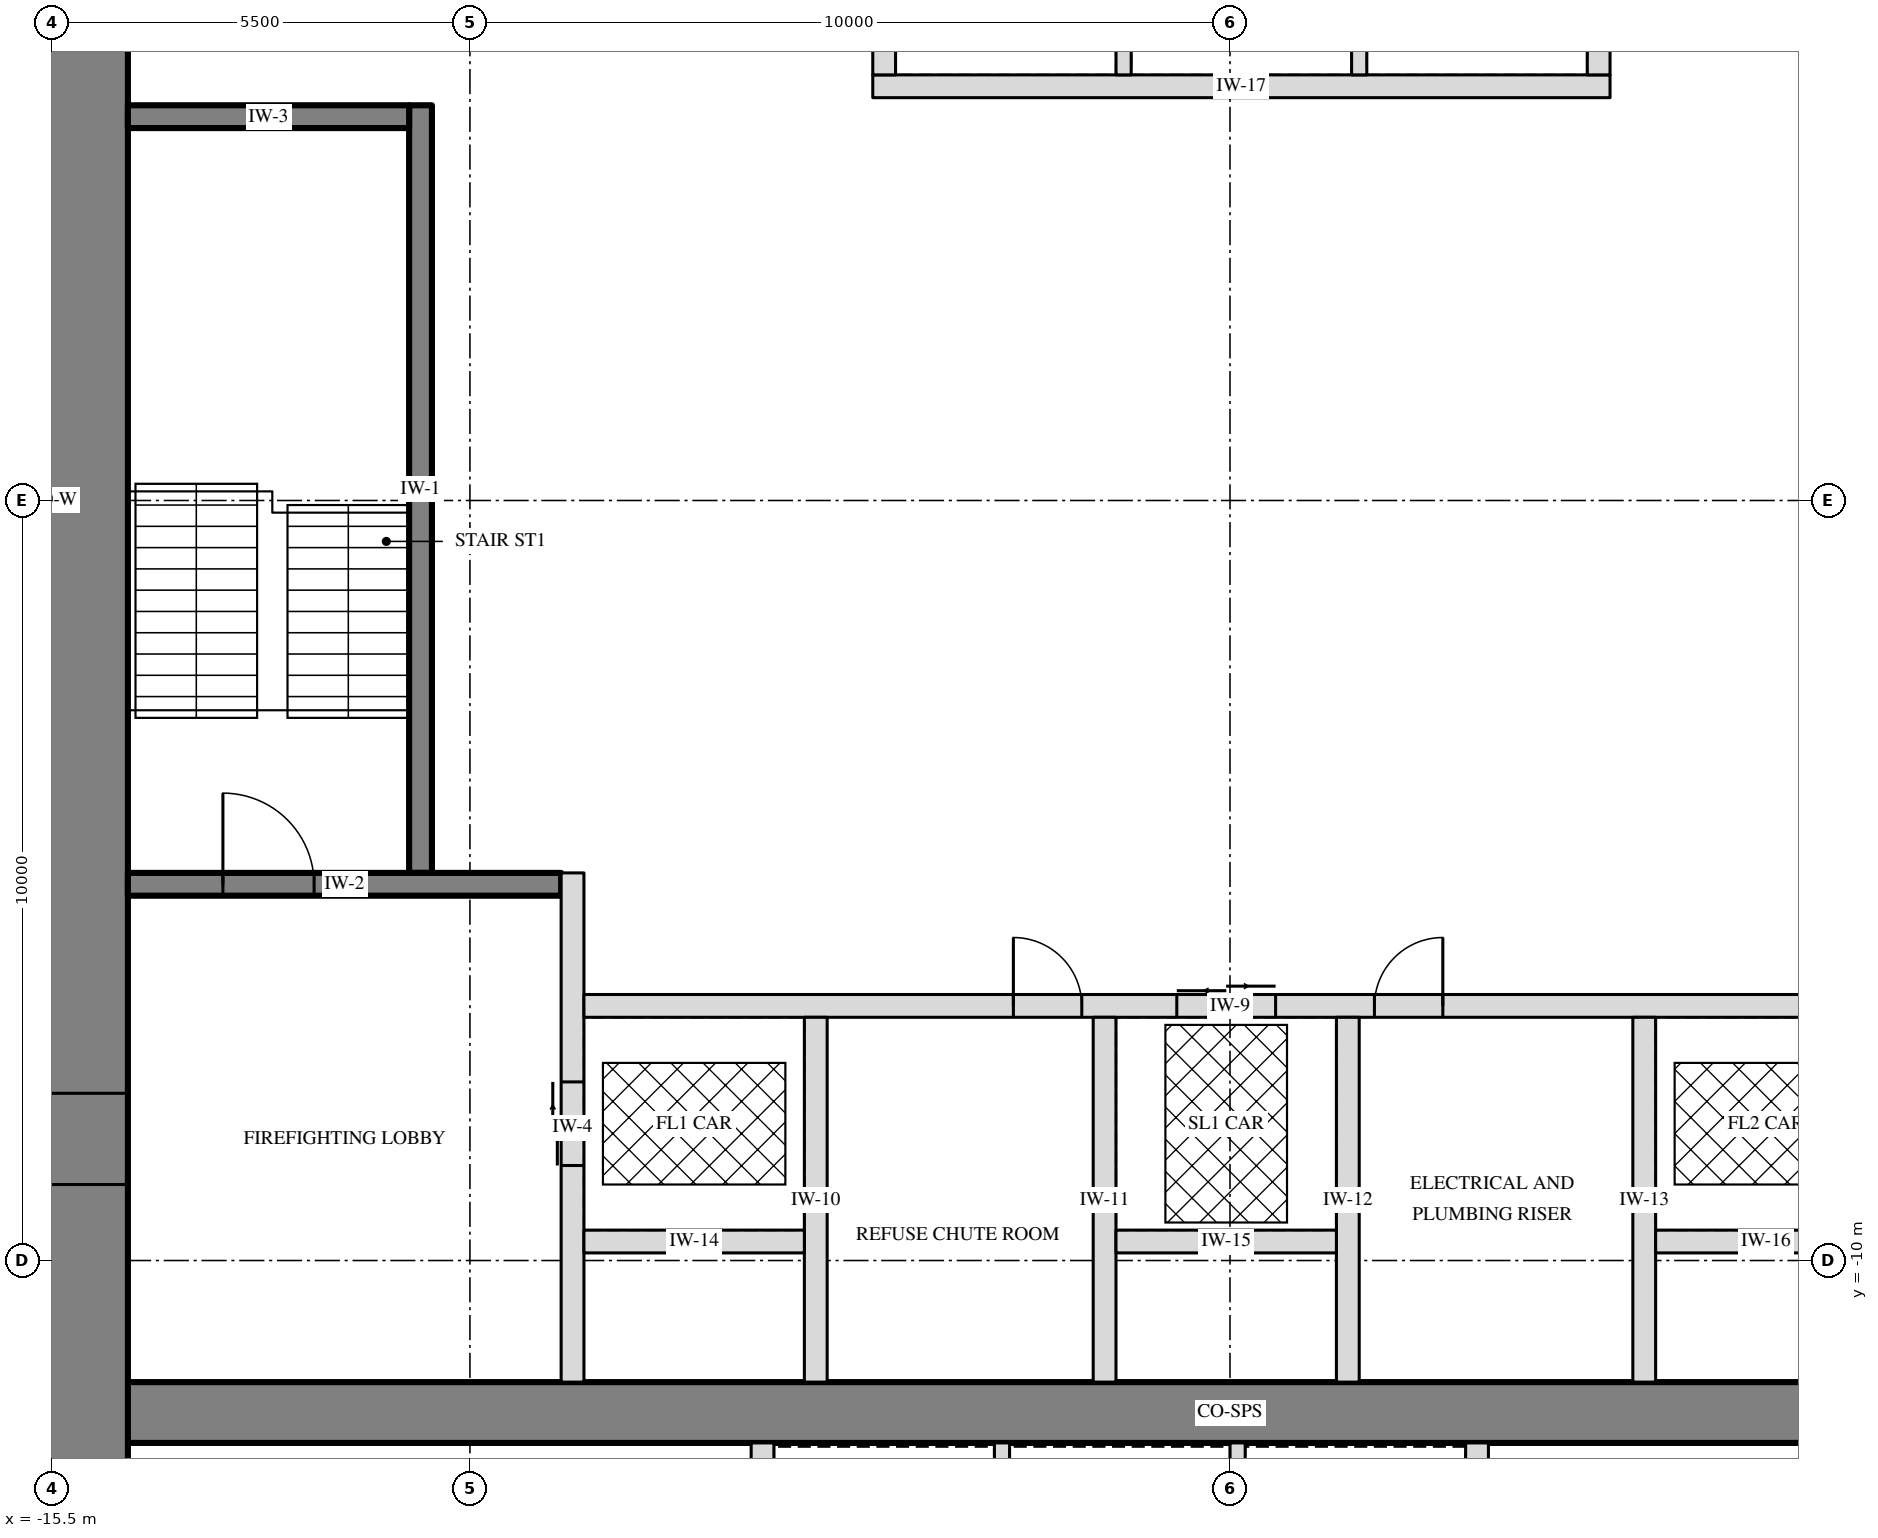
"""IFC4 building model, lengths in metres.
Left out: names, types, materials, properties, quantities, classifications, styles, units other than length and angle.
Written with IfcOpenShell. Run it as: python <this file> out.ifc"""

import sys

from ifc_helpers import new_model, si_unit, direction, frame, frame_2d, origin, place, context, subcontext, project, spatial, rectangle, extrude, element, fill, save


model = new_model("IFC4")
c1 = context("Model", 3, precision=1e-05, world=origin(), true_north=direction((0.0, 1.0)))
c2 = subcontext(c1, "Body", "Model", "MODEL_VIEW")
j1 = project(units=[si_unit("LENGTHUNIT", "METRE"), si_unit("PLANEANGLEUNIT", "RADIAN")], contexts=[c1])
p1 = place(None, origin())
s1 = spatial("IfcSite", under=j1, at=p1, CompositionType="ELEMENT")
p2 = place(p1, origin())
s2 = spatial("IfcBuilding", under=s1, at=p2, CompositionType="ELEMENT")
p3 = place(p2, frame((0.0, 0.0, 107.25)))
s3 = spatial("IfcBuildingStorey", under=s2, at=p3, CompositionType="ELEMENT", Elevation=107.25)
p4 = place(p3, frame((-15.5, -12.0, -0.25), z_axis=(0.0, 0.0, 1.0), x_axis=(1.0, 0.0, 0.0)))
e1 = element("IfcWall", 1, at=p4, inside=s3, PredefinedType="SHEAR", context=c2, shape_type="SweptSolid", body=[
    extrude(rectangle(XDim=31.0, YDim=0.8, at=frame_2d((15.5, 0.0))), origin(), (0.0, 0.0, 1.0), 3.75),
])
p5 = place(p3, frame((-15.5, -15.5, -0.25), z_axis=(0.0, 0.0, 1.0), x_axis=(0.0, 1.0, 0.0)))
e2 = element("IfcWall", 2, at=p5, inside=s3, PredefinedType="SHEAR", context=c2, shape_type="SweptSolid", body=[
    extrude(rectangle(XDim=31.0, YDim=2.0, at=frame_2d((15.5, 0.0))), origin(), (0.0, 0.0, 1.0), 3.75),
])
p6 = place(p5, frame((6.5, 0.0, 0.25)))
e3 = element("IfcOpeningElement", 3, at=p6, cuts=e2, PredefinedType="OPENING", context=c2, shape_type="SweptSolid", body=[
    extrude(rectangle(XDim=1.2, YDim=2.1, at=frame_2d((0.6, 1.05))), frame((0.0, 1.01, 0.0), z_axis=(0.0, -1.0, 0.0), x_axis=(1.0, 0.0, 0.0)), (0.0, 0.0, 1.0), 2.02),
])
p7 = place(p5, frame((23.0, 0.0, 0.25)))
e4 = element("IfcOpeningElement", 4, at=p7, cuts=e2, PredefinedType="OPENING", context=c2, shape_type="SweptSolid", body=[
    extrude(rectangle(XDim=1.8, YDim=2.1, at=frame_2d((0.9, 1.05))), frame((0.0, 1.01, 0.0), z_axis=(0.0, -1.0, 0.0), x_axis=(1.0, 0.0, 0.0)), (0.0, 0.0, 1.0), 2.02),
])
p8 = place(p3, frame((-10.65, -4.9, 0.0), z_axis=(0.0, 0.0, 1.0), x_axis=(0.0, 1.0, 0.0)))
e5 = element("IfcWall", 5, at=p8, inside=s3, PredefinedType="SOLIDWALL", context=c2, shape_type="SweptSolid", body=[
    extrude(rectangle(XDim=10.1, YDim=0.3, at=frame_2d((5.05, 0.0))), origin(), (0.0, 0.0, 1.0), 3.5),
])
p9 = place(p3, frame((-14.5, -5.05, 0.0), z_axis=(0.0, 0.0, 1.0), x_axis=(1.0, 0.0, 0.0)))
e6 = element("IfcWall", 6, at=p9, inside=s3, PredefinedType="SOLIDWALL", context=c2, shape_type="SweptSolid", body=[
    extrude(rectangle(XDim=5.7, YDim=0.3, at=frame_2d((2.85, 0.0))), origin(), (0.0, 0.0, 1.0), 3.5),
])
p10 = place(p9, frame((1.25, 0.0, 0.0)))
e7 = element("IfcOpeningElement", 7, at=p10, cuts=e6, PredefinedType="OPENING", context=c2, shape_type="SweptSolid", body=[
    extrude(rectangle(XDim=1.2, YDim=2.1, at=frame_2d((0.6, 1.05))), frame((0.0, 0.16, 0.0), z_axis=(0.0, -1.0, 0.0), x_axis=(1.0, 0.0, 0.0)), (0.0, 0.0, 1.0), 0.32),
])
p11 = place(p3, frame((-14.5, 5.05, 0.0), z_axis=(0.0, 0.0, 1.0), x_axis=(1.0, 0.0, 0.0)))
e8 = element("IfcWall", 8, at=p11, inside=s3, PredefinedType="SOLIDWALL", context=c2, shape_type="SweptSolid", body=[
    extrude(rectangle(XDim=3.7, YDim=0.3, at=frame_2d((1.85, 0.0))), origin(), (0.0, 0.0, 1.0), 3.5),
])
p12 = place(p3, frame((-8.65, -11.6, 0.0), z_axis=(0.0, 0.0, 1.0), x_axis=(0.0, 1.0, 0.0)))
e9 = element("IfcWall", 9, at=p12, inside=s3, PredefinedType="PARTITIONING", context=c2, shape_type="SweptSolid", body=[
    extrude(rectangle(XDim=6.7, YDim=0.3, at=frame_2d((3.35, 0.0))), origin(), (0.0, 0.0, 1.0), 3.5),
])
p13 = place(p12, frame((2.85, 0.0, 0.0)))
e10 = element("IfcOpeningElement", 10, at=p13, cuts=e9, PredefinedType="OPENING", context=c2, shape_type="SweptSolid", body=[
    extrude(rectangle(XDim=1.1, YDim=2.1, at=frame_2d((0.55, 1.05))), frame((0.0, 0.16, 0.0), z_axis=(0.0, -1.0, 0.0), x_axis=(1.0, 0.0, 0.0)), (0.0, 0.0, 1.0), 0.32),
])
p14 = place(p3, frame((-8.5, -6.65, 0.0), z_axis=(0.0, 0.0, 1.0), x_axis=(1.0, 0.0, 0.0)))
e11 = element("IfcWall", 11, at=p14, inside=s3, PredefinedType="PARTITIONING", context=c2, shape_type="SweptSolid", body=[
    extrude(rectangle(XDim=17.0, YDim=0.3, at=frame_2d((8.5, 0.0))), origin(), (0.0, 0.0, 1.0), 3.5),
])
p15 = place(p14, frame((7.8, 0.0, 0.0)))
e12 = element("IfcOpeningElement", 12, at=p15, cuts=e11, PredefinedType="OPENING", context=c2, shape_type="SweptSolid", body=[
    extrude(rectangle(XDim=1.3, YDim=2.4, at=frame_2d((0.65, 1.2))), frame((0.0, 0.16, 0.0), z_axis=(0.0, -1.0, 0.0), x_axis=(1.0, 0.0, 0.0)), (0.0, 0.0, 1.0), 0.32),
])
p16 = place(p14, frame((5.65, 0.0, 0.0)))
e13 = element("IfcOpeningElement", 13, at=p16, cuts=e11, PredefinedType="OPENING", context=c2, shape_type="SweptSolid", body=[
    extrude(rectangle(XDim=0.9, YDim=2.1, at=frame_2d((0.45, 1.05))), frame((0.0, 0.16, 0.0), z_axis=(0.0, -1.0, 0.0), x_axis=(1.0, 0.0, 0.0)), (0.0, 0.0, 1.0), 0.32),
])
p17 = place(p14, frame((10.4, 0.0, 0.0)))
e14 = element("IfcOpeningElement", 14, at=p17, cuts=e11, PredefinedType="OPENING", context=c2, shape_type="SweptSolid", body=[
    extrude(rectangle(XDim=0.9, YDim=2.1, at=frame_2d((0.45, 1.05))), frame((0.0, 0.16, 0.0), z_axis=(0.0, -1.0, 0.0), x_axis=(1.0, 0.0, 0.0)), (0.0, 0.0, 1.0), 0.32),
])
for number, where, z_axis, x_axis in (
    (15, (-5.45, -11.6, 0.0), (0.0, 0.0, 1.0), (0.0, 1.0, 0.0)),
    (16, (-1.65, -11.6, 0.0), (0.0, 0.0, 1.0), (0.0, 1.0, 0.0)),
    (17, (1.55, -11.6, 0.0), (0.0, 0.0, 1.0), (0.0, 1.0, 0.0)),
    (18, (5.45, -11.6, 0.0), (0.0, 0.0, 1.0), (0.0, 1.0, 0.0)),
):
    element("IfcWall", number, at=place(p3, frame(where, z_axis=z_axis, x_axis=x_axis)), inside=s3, PredefinedType="PARTITIONING", context=c2, shape_type="SweptSolid", body=[
        extrude(rectangle(XDim=4.8, YDim=0.3, at=frame_2d((2.4, 0.0))), origin(), (0.0, 0.0, 1.0), 3.5),
    ])
for number, where, z_axis, x_axis in (
    (19, (-8.5, -9.75, 0.0), (0.0, 0.0, 1.0), (1.0, 0.0, 0.0)),
    (20, (-1.5, -9.75, 0.0), (0.0, 0.0, 1.0), (1.0, 0.0, 0.0)),
    (21, (5.6, -9.75, 0.0), (0.0, 0.0, 1.0), (1.0, 0.0, 0.0)),
):
    element("IfcWall", number, at=place(p3, frame(where, z_axis=z_axis, x_axis=x_axis)), inside=s3, PredefinedType="PARTITIONING", context=c2, shape_type="SweptSolid", body=[
        extrude(rectangle(XDim=2.9, YDim=0.3, at=frame_2d((1.45, 0.0))), origin(), (0.0, 0.0, 1.0), 3.5),
    ])
p18 = place(p3, frame((-4.7, 5.45, 0.0), z_axis=(0.0, 0.0, 1.0), x_axis=(1.0, 0.0, 0.0)))
e22 = element("IfcWall", 22, at=p18, inside=s3, PredefinedType="PARTITIONING", context=c2, shape_type="SweptSolid", body=[
    extrude(rectangle(XDim=9.7, YDim=0.3, at=frame_2d((4.85, 0.0))), origin(), (0.0, 0.0, 1.0), 3.5),
])
for number, where, z_axis, x_axis in (
    (23, (-4.55, 5.6, 0.0), (0.0, 0.0, 1.0), (0.0, 1.0, 0.0)),
    (24, (4.85, 5.6, 0.0), (0.0, 0.0, 1.0), (0.0, 1.0, 0.0)),
):
    element("IfcWall", number, at=place(p3, frame(where, z_axis=z_axis, x_axis=x_axis)), inside=s3, PredefinedType="PARTITIONING", context=c2, shape_type="SweptSolid", body=[
        extrude(rectangle(XDim=2.8, YDim=0.3, at=frame_2d((1.4, 0.0))), origin(), (0.0, 0.0, 1.0), 3.5),
    ])
for number, where, z_axis, x_axis in (
    (25, (-1.4, 5.6, 0.0), (0.0, 0.0, 1.0), (0.0, 1.0, 0.0)),
    (26, (1.7, 5.6, 0.0), (0.0, 0.0, 1.0), (0.0, 1.0, 0.0)),
):
    element("IfcWall", number, at=place(p3, frame(where, z_axis=z_axis, x_axis=x_axis)), inside=s3, PredefinedType="PARTITIONING", context=c2, shape_type="SweptSolid", body=[
        extrude(rectangle(XDim=2.8, YDim=0.2, at=frame_2d((1.4, 0.0))), origin(), (0.0, 0.0, 1.0), 3.5),
    ])
for number, where, z_axis, x_axis in (
    (27, (-6.15, -14.5, 0.0), (0.0, 0.0, 1.0), (0.0, 1.0, 0.0)),
    (28, (3.25, -14.5, 0.0), (0.0, 0.0, 1.0), (0.0, 1.0, 0.0)),
):
    element("IfcWall", number, at=place(p3, frame(where, z_axis=z_axis, x_axis=x_axis)), inside=s3, PredefinedType="PARTITIONING", context=c2, shape_type="SweptSolid", body=[
        extrude(rectangle(XDim=2.1, YDim=0.3, at=frame_2d((1.05, 0.0))), origin(), (0.0, 0.0, 1.0), 3.5),
    ])
for number, where, z_axis, x_axis in (
    (29, (-3.0, -14.5, 0.0), (0.0, 0.0, 1.0), (0.0, 1.0, 0.0)),
    (30, (0.1, -14.5, 0.0), (0.0, 0.0, 1.0), (0.0, 1.0, 0.0)),
):
    element("IfcWall", number, at=place(p3, frame(where, z_axis=z_axis, x_axis=x_axis)), inside=s3, PredefinedType="PARTITIONING", context=c2, shape_type="SweptSolid", body=[
        extrude(rectangle(XDim=2.1, YDim=0.2, at=frame_2d((1.05, 0.0))), origin(), (0.0, 0.0, 1.0), 3.5),
    ])
p19 = place(p3, frame((-10.65, 2.8, 0.0), z_axis=(0.0, 0.0, 1.0), x_axis=(1.0, 0.0, 0.0)))
e31 = element("IfcWall", 31, at=p19, inside=s3, PredefinedType="PARTITIONING", context=c2, shape_type="SweptSolid", body=[
    extrude(rectangle(XDim=21.3, YDim=0.3, at=frame_2d((10.65, 0.0))), origin(), (0.0, 0.0, 1.0), 3.5),
])
p20 = place(p19, frame((10.05, 0.0, 0.0)))
e32 = element("IfcOpeningElement", 32, at=p20, cuts=e31, PredefinedType="OPENING", context=c2, shape_type="SweptSolid", body=[
    extrude(rectangle(XDim=1.2, YDim=2.1, at=frame_2d((0.6, 1.05))), frame((0.0, 0.16, 0.0), z_axis=(0.0, -1.0, 0.0), x_axis=(1.0, 0.0, 0.0)), (0.0, 0.0, 1.0), 0.32),
])
p21 = place(p19, frame((1.493, 0.0, 0.0)))
e33 = element("IfcOpeningElement", 33, at=p21, cuts=e31, PredefinedType="OPENING", context=c2, shape_type="SweptSolid", body=[
    extrude(rectangle(XDim=0.9, YDim=2.1, at=frame_2d((0.45, 1.05))), frame((0.0, 0.16, 0.0), z_axis=(0.0, -1.0, 0.0), x_axis=(1.0, 0.0, 0.0)), (0.0, 0.0, 1.0), 0.32),
])
p22 = place(p19, frame((18.836, 0.0, 0.0)))
e34 = element("IfcOpeningElement", 34, at=p22, cuts=e31, PredefinedType="OPENING", context=c2, shape_type="SweptSolid", body=[
    extrude(rectangle(XDim=0.9, YDim=2.1, at=frame_2d((0.45, 1.05))), frame((0.0, 0.16, 0.0), z_axis=(0.0, -1.0, 0.0), x_axis=(1.0, 0.0, 0.0)), (0.0, 0.0, 1.0), 0.32),
])
p23 = place(p3, frame((-3.3, -6.65, 0.0), z_axis=(0.0, 0.0, 1.0), x_axis=(0.0, 1.0, 0.0)))
e35 = element("IfcWall", 35, at=p23, inside=s3, PredefinedType="PARTITIONING", context=c2, shape_type="SweptSolid", body=[
    extrude(rectangle(XDim=9.45, YDim=0.3, at=frame_2d((4.725, 0.0))), origin(), (0.0, 0.0, 1.0), 3.5),
])
p24 = place(p23, frame((4.275, 0.0, 0.0)))
e36 = element("IfcOpeningElement", 36, at=p24, cuts=e35, PredefinedType="OPENING", context=c2, shape_type="SweptSolid", body=[
    extrude(rectangle(XDim=0.9, YDim=2.1, at=frame_2d((0.45, 1.05))), frame((0.0, 0.16, 0.0), z_axis=(0.0, -1.0, 0.0), x_axis=(1.0, 0.0, 0.0)), (0.0, 0.0, 1.0), 0.32),
])
p25 = place(p3, frame((3.3, -6.65, 0.0), z_axis=(0.0, 0.0, 1.0), x_axis=(0.0, 1.0, 0.0)))
e37 = element("IfcWall", 37, at=p25, inside=s3, PredefinedType="PARTITIONING", context=c2, shape_type="SweptSolid", body=[
    extrude(rectangle(XDim=9.45, YDim=0.3, at=frame_2d((4.725, 0.0))), origin(), (0.0, 0.0, 1.0), 3.5),
])
p26 = place(p25, frame((4.275, 0.0, 0.0)))
e38 = element("IfcOpeningElement", 38, at=p26, cuts=e37, PredefinedType="OPENING", context=c2, shape_type="SweptSolid", body=[
    extrude(rectangle(XDim=0.9, YDim=2.1, at=frame_2d((0.45, 1.05))), frame((0.0, 0.16, 0.0), z_axis=(0.0, -1.0, 0.0), x_axis=(1.0, 0.0, 0.0)), (0.0, 0.0, 1.0), 0.32),
])
for number, where, z_axis, x_axis in (
    (39, (-6.764, -6.65, 0.0), (0.0, 0.0, 1.0), (0.0, 1.0, 0.0)),
    (40, (6.622, -6.65, 0.0), (0.0, 0.0, 1.0), (0.0, 1.0, 0.0)),
):
    element("IfcWall", number, at=place(p3, frame(where, z_axis=z_axis, x_axis=x_axis)), inside=s3, PredefinedType="PARTITIONING", context=c2, shape_type="SweptSolid", body=[
        extrude(rectangle(XDim=9.45, YDim=0.3, at=frame_2d((4.725, 0.0))), origin(), (0.0, 0.0, 1.0), 3.5),
    ])
p27 = place(p10, origin())
e41 = element("IfcDoor", 41, at=p27, inside=s3, OperationType="SINGLE_SWING_LEFT", PredefinedType="DOOR", context=c2, shape_type="SweptSolid", body=[
    extrude(rectangle(XDim=1.2, YDim=2.1, at=frame_2d((0.6, 1.05))), frame((0.0, 0.025, 0.0), z_axis=(0.0, -1.0, 0.0), x_axis=(1.0, 0.0, 0.0)), (0.0, 0.0, 1.0), 0.05),
])
fill(e7, e41)
p28 = place(p6, origin())
e42 = element("IfcDoor", 42, at=p28, inside=s3, OperationType="SINGLE_SWING_LEFT", PredefinedType="DOOR", context=c2, shape_type="SweptSolid", body=[
    extrude(rectangle(XDim=1.2, YDim=2.1, at=frame_2d((0.6, 1.05))), frame((0.0, 0.025, 0.0), z_axis=(0.0, -1.0, 0.0), x_axis=(1.0, 0.0, 0.0)), (0.0, 0.0, 1.0), 0.05),
])
fill(e3, e42)
p29 = place(p13, origin())
e43 = element("IfcDoor", 43, at=p29, inside=s3, OperationType="DOUBLE_DOOR_SLIDING", PredefinedType="DOOR", context=c2, shape_type="SweptSolid", body=[
    extrude(rectangle(XDim=1.1, YDim=2.1, at=frame_2d((0.55, 1.05))), frame((0.0, 0.025, 0.0), z_axis=(0.0, -1.0, 0.0), x_axis=(1.0, 0.0, 0.0)), (0.0, 0.0, 1.0), 0.05),
])
fill(e10, e43)
p30 = place(p15, origin())
e44 = element("IfcDoor", 44, at=p30, inside=s3, OperationType="DOUBLE_DOOR_SLIDING", PredefinedType="DOOR", context=c2, shape_type="SweptSolid", body=[
    extrude(rectangle(XDim=1.3, YDim=2.4, at=frame_2d((0.65, 1.2))), frame((0.0, 0.025, 0.0), z_axis=(0.0, -1.0, 0.0), x_axis=(1.0, 0.0, 0.0)), (0.0, 0.0, 1.0), 0.05),
])
fill(e12, e44)
p31 = place(p20, origin())
e45 = element("IfcDoor", 45, at=p31, inside=s3, OperationType="SINGLE_SWING_LEFT", PredefinedType="DOOR", context=c2, shape_type="SweptSolid", body=[
    extrude(rectangle(XDim=1.2, YDim=2.1, at=frame_2d((0.6, 1.05))), frame((0.0, 0.025, 0.0), z_axis=(0.0, -1.0, 0.0), x_axis=(1.0, 0.0, 0.0)), (0.0, 0.0, 1.0), 0.05),
])
fill(e32, e45)
p32 = place(p16, origin())
e46 = element("IfcDoor", 46, at=p32, inside=s3, OperationType="SINGLE_SWING_LEFT", PredefinedType="DOOR", context=c2, shape_type="SweptSolid", body=[
    extrude(rectangle(XDim=0.9, YDim=2.1, at=frame_2d((0.45, 1.05))), frame((0.0, 0.025, 0.0), z_axis=(0.0, -1.0, 0.0), x_axis=(1.0, 0.0, 0.0)), (0.0, 0.0, 1.0), 0.05),
])
fill(e13, e46)
p33 = place(p17, origin())
e47 = element("IfcDoor", 47, at=p33, inside=s3, OperationType="SINGLE_SWING_RIGHT", PredefinedType="DOOR", context=c2, shape_type="SweptSolid", body=[
    extrude(rectangle(XDim=0.9, YDim=2.1, at=frame_2d((0.45, 1.05))), frame((0.0, 0.025, 0.0), z_axis=(0.0, -1.0, 0.0), x_axis=(1.0, 0.0, 0.0)), (0.0, 0.0, 1.0), 0.05),
])
fill(e14, e47)
p34 = place(p24, origin())
e48 = element("IfcDoor", 48, at=p34, inside=s3, OperationType="SINGLE_SWING_LEFT", PredefinedType="DOOR", context=c2, shape_type="SweptSolid", body=[
    extrude(rectangle(XDim=0.9, YDim=2.1, at=frame_2d((0.45, 1.05))), frame((0.0, 0.025, 0.0), z_axis=(0.0, -1.0, 0.0), x_axis=(1.0, 0.0, 0.0)), (0.0, 0.0, 1.0), 0.05),
])
fill(e36, e48)
p35 = place(p21, origin())
e49 = element("IfcDoor", 49, at=p35, inside=s3, OperationType="SINGLE_SWING_LEFT", PredefinedType="DOOR", context=c2, shape_type="SweptSolid", body=[
    extrude(rectangle(XDim=0.9, YDim=2.1, at=frame_2d((0.45, 1.05))), frame((0.0, 0.025, 0.0), z_axis=(0.0, -1.0, 0.0), x_axis=(1.0, 0.0, 0.0)), (0.0, 0.0, 1.0), 0.05),
])
fill(e33, e49)
p36 = place(p26, origin())
e50 = element("IfcDoor", 50, at=p36, inside=s3, OperationType="SINGLE_SWING_LEFT", PredefinedType="DOOR", context=c2, shape_type="SweptSolid", body=[
    extrude(rectangle(XDim=0.9, YDim=2.1, at=frame_2d((0.45, 1.05))), frame((0.0, 0.025, 0.0), z_axis=(0.0, -1.0, 0.0), x_axis=(1.0, 0.0, 0.0)), (0.0, 0.0, 1.0), 0.05),
])
fill(e38, e50)
save(model, sys.argv[1])
